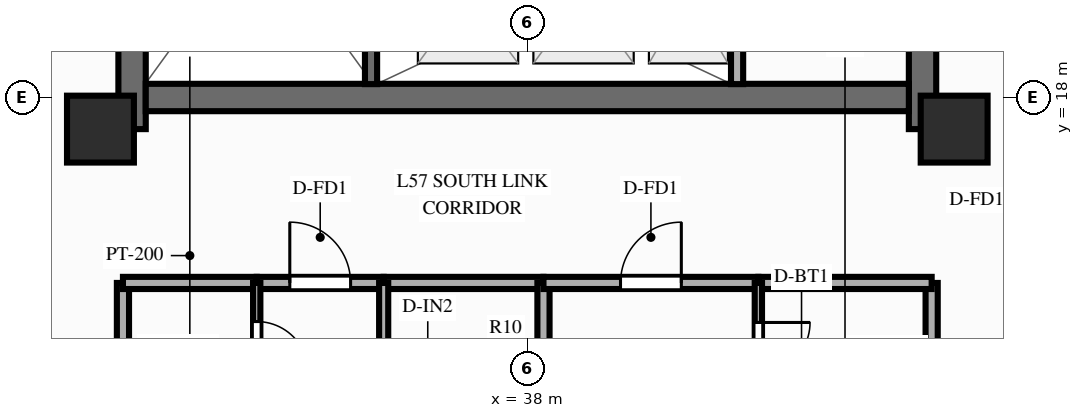
"""IFC4 building model, lengths in metres.
Left out: names, types, materials, properties, quantities, classifications, styles, units other than length and angle.
Written with IfcOpenShell. Run it as: python <this file> out.ifc"""

import sys

from ifc_helpers import new_model, si_unit, direction, frame, frame_2d, origin, origin_2d, place, context, subcontext, project, spatial, rectangle, extrude, source, transform, mapped, element, fill, save


model = new_model("IFC4")
c1 = context("Model", 3, precision=1e-05, world=origin(), true_north=direction((0.0, 1.0)))
c2 = subcontext(c1, "Body", "Model", "MODEL_VIEW")
j1 = project(units=[si_unit("LENGTHUNIT", "METRE"), si_unit("PLANEANGLEUNIT", "RADIAN")], contexts=[c1])
p1 = place(None, origin())
s1 = spatial("IfcSite", under=j1, at=p1, CompositionType="ELEMENT")
p2 = place(p1, origin())
s2 = spatial("IfcBuilding", under=s1, at=p2, CompositionType="ELEMENT")
p3 = place(p2, frame((0.0, 0.0, 182.8)))
s3 = spatial("IfcBuildingStorey", under=s2, at=p3, CompositionType="ELEMENT", Elevation=182.8)
p4 = place(p3, frame((31.5, 17.48, 0.0), z_axis=(0.0, 0.0, 1.0), x_axis=(0.0, 1.0, 0.0)))
e1 = element("IfcWall", 1, at=p4, inside=s3, PredefinedType="SHEAR", context=c2, shape_type="SweptSolid", body=[
    extrude(rectangle(XDim=19.04, YDim=0.45, at=frame_2d((9.52, 0.0))), origin(), (0.0, 0.0, 1.0), 3.9),
])
p5 = place(p4, frame((6.32, 0.0, 0.0)))
e2 = element("IfcOpeningElement", 2, at=p5, cuts=e1, PredefinedType="OPENING", context=c2, shape_type="SweptSolid", body=[
    extrude(rectangle(XDim=1.1, YDim=2.15, at=frame_2d((0.55, 1.075))), frame((0.0, 0.237, 0.0), z_axis=(0.0, -1.0, 0.0), x_axis=(1.0, 0.0, 0.0)), (0.0, 0.0, 1.0), 0.474),
])
p6 = place(p3, frame((44.5, 17.48, 0.0), z_axis=(0.0, 0.0, 1.0), x_axis=(0.0, 1.0, 0.0)))
e3 = element("IfcWall", 3, at=p6, inside=s3, PredefinedType="SHEAR", context=c2, shape_type="SweptSolid", body=[
    extrude(rectangle(XDim=19.04, YDim=0.45, at=frame_2d((9.52, 0.0))), origin(), (0.0, 0.0, 1.0), 3.9),
])
p7 = place(p6, frame((12.67, 0.0, 0.0), z_axis=(0.0, 0.0, 1.0), x_axis=(-1.0, 0.0, 0.0)))
e4 = element("IfcOpeningElement", 4, at=p7, cuts=e3, PredefinedType="OPENING", context=c2, shape_type="SweptSolid", body=[
    extrude(rectangle(XDim=1.1, YDim=2.15, at=frame_2d((0.55, 1.075))), frame((0.0, 0.237, 0.0), z_axis=(0.0, -1.0, 0.0), x_axis=(1.0, 0.0, 0.0)), (0.0, 0.0, 1.0), 0.474),
])
p8 = place(p3, frame((31.725, 18.0, 0.0), z_axis=(0.0, 0.0, 1.0), x_axis=(1.0, 0.0, 0.0)))
e5 = element("IfcWall", 5, at=p8, inside=s3, PredefinedType="SHEAR", context=c2, shape_type="SweptSolid", body=[
    extrude(rectangle(XDim=12.55, YDim=0.45, at=frame_2d((6.275, 0.0))), origin(), (0.0, 0.0, 1.0), 3.9),
])
m1 = source(origin(), c2, "Body", "SweptSolid", [
    extrude(rectangle(XDim=1.1, YDim=1.1, at=origin_2d()), origin(), (0.0, 0.0, 1.0), 3.9),
])
for number, where, z_axis, x_axis in (
    (6, (30.98, 17.48, 0.0), (0.0, 0.0, 1.0), (1.0, 0.0, 0.0)),
    (7, (45.02, 17.48, 0.0), (0.0, 0.0, 1.0), (1.0, 0.0, 0.0)),
):
    element("IfcColumn", number, at=place(p3, frame(where, z_axis=z_axis, x_axis=x_axis)), inside=s3, PredefinedType="COLUMN", context=c2, shape_type="MappedRepresentation", body=[
        mapped(m1, transform((0.0, 0.0, 0.0), scale=1.0)),
    ])
p9 = place(p3, frame((41.45, 18.22, 0.0), z_axis=(0.0, 0.0, 1.0), x_axis=(0.0, 1.0, 0.0)))
e8 = element("IfcWall", 8, at=p9, inside=s3, PredefinedType="PARTITIONING", context=c2, shape_type="SweptSolid", body=[
    extrude(rectangle(XDim=2.86, YDim=0.2, at=frame_2d((1.43, 0.0))), origin(), (0.0, 0.0, 1.0), 3.69),
])
p10 = place(p3, frame((35.43, 18.22, 0.0), z_axis=(0.0, 0.0, 1.0), x_axis=(0.0, 1.0, 0.0)))
e9 = element("IfcWall", 9, at=p10, inside=s3, PredefinedType="SOLIDWALL", context=c2, shape_type="SweptSolid", body=[
    extrude(rectangle(XDim=7.22, YDim=0.2, at=frame_2d((3.61, 0.0))), origin(), (0.0, 0.0, 1.0), 3.69),
])
p11 = place(p10, frame((6.68, 0.0, 0.0), z_axis=(0.0, 0.0, 1.0), x_axis=(-1.0, 0.0, 0.0)))
e10 = element("IfcOpeningElement", 10, at=p11, cuts=e9, PredefinedType="OPENING", context=c2, shape_type="SweptSolid", body=[
    extrude(rectangle(XDim=1.1, YDim=2.15, at=frame_2d((0.55, 1.075))), frame((0.0, 0.112, 0.0), z_axis=(0.0, -1.0, 0.0), x_axis=(1.0, 0.0, 0.0)), (0.0, 0.0, 1.0), 0.224),
])
for number, where, z_axis, x_axis in (
    (11, (31.35, 14.95, 0.0), (0.0, 0.0, 1.0), (0.0, -1.0, 0.0)),
    (12, (44.65, 14.95, 0.0), (0.0, 0.0, 1.0), (0.0, -1.0, 0.0)),
):
    element("IfcWall", number, at=place(p3, frame(where, z_axis=z_axis, x_axis=x_axis)), inside=s3, PredefinedType="PARTITIONING", context=c2, shape_type="SweptSolid", body=[
        extrude(rectangle(XDim=8.8, YDim=0.2, at=frame_2d((4.4, 0.0))), origin(), (0.0, 0.0, 1.0), 2.79),
    ])
p12 = place(p3, frame((31.35, 14.95, 0.0), z_axis=(0.0, 0.0, 1.0), x_axis=(1.0, 0.0, 0.0)))
e13 = element("IfcWall", 13, at=p12, inside=s3, PredefinedType="PARTITIONING", context=c2, shape_type="SweptSolid", body=[
    extrude(rectangle(XDim=2.2, YDim=0.2, at=frame_2d((1.1, 0.0))), origin(), (0.0, 0.0, 1.0), 3.69),
])
p13 = place(p3, frame((33.55, 14.95, 0.0), z_axis=(0.0, 0.0, 1.0), x_axis=(1.0, 0.0, 0.0)))
e14 = element("IfcWall", 14, at=p13, inside=s3, PredefinedType="PARTITIONING", context=c2, shape_type="SweptSolid", body=[
    extrude(rectangle(XDim=2.088, YDim=0.2, at=frame_2d((1.044, 0.0))), origin(), (0.0, 0.0, 1.0), 3.69),
])
p14 = place(p13, frame((0.544, 0.0, 0.0)))
e15 = element("IfcOpeningElement", 15, at=p14, cuts=e14, PredefinedType="OPENING", context=c2, shape_type="SweptSolid", body=[
    extrude(rectangle(XDim=1.0, YDim=2.15, at=frame_2d((0.5, 1.075))), frame((0.0, 0.112, 0.0), z_axis=(0.0, -1.0, 0.0), x_axis=(1.0, 0.0, 0.0)), (0.0, 0.0, 1.0), 0.224),
])
p15 = place(p3, frame((35.638, 14.95, 0.0), z_axis=(0.0, 0.0, 1.0), x_axis=(1.0, 0.0, 0.0)))
e16 = element("IfcWall", 16, at=p15, inside=s3, PredefinedType="PARTITIONING", context=c2, shape_type="SweptSolid", body=[
    extrude(rectangle(XDim=2.628, YDim=0.2, at=frame_2d((1.314, 0.0))), origin(), (0.0, 0.0, 1.0), 3.69),
])
p16 = place(p3, frame((33.55, 14.95, 0.0), z_axis=(0.0, 0.0, 1.0), x_axis=(0.0, -1.0, 0.0)))
e17 = element("IfcWall", 17, at=p16, inside=s3, PredefinedType="PARTITIONING", context=c2, shape_type="SweptSolid", body=[
    extrude(rectangle(XDim=2.12, YDim=0.12, at=frame_2d((1.06, 0.0))), origin(), (0.0, 0.0, 1.0), 3.69),
])
p17 = place(p16, frame((0.635, 0.0, 0.0)))
e18 = element("IfcOpeningElement", 18, at=p17, cuts=e17, PredefinedType="OPENING", context=c2, shape_type="SweptSolid", body=[
    extrude(rectangle(XDim=0.85, YDim=2.05, at=frame_2d((0.425, 1.025))), frame((0.0, 0.072, 0.0), z_axis=(0.0, -1.0, 0.0), x_axis=(1.0, 0.0, 0.0)), (0.0, 0.0, 1.0), 0.144),
])
p18 = place(p3, frame((35.638, 14.95, 0.0), z_axis=(0.0, 0.0, 1.0), x_axis=(0.0, -1.0, 0.0)))
e19 = element("IfcWall", 19, at=p18, inside=s3, PredefinedType="PARTITIONING", context=c2, shape_type="SweptSolid", body=[
    extrude(rectangle(XDim=3.16, YDim=0.15, at=frame_2d((1.58, 0.0))), origin(), (0.0, 0.0, 1.0), 3.69),
])
p19 = place(p18, frame((1.13, 0.0, 0.0)))
e20 = element("IfcOpeningElement", 20, at=p19, cuts=e19, PredefinedType="OPENING", context=c2, shape_type="SweptSolid", body=[
    extrude(rectangle(XDim=0.9, YDim=2.1, at=frame_2d((0.45, 1.05))), frame((0.0, 0.087, 0.0), z_axis=(0.0, -1.0, 0.0), x_axis=(1.0, 0.0, 0.0)), (0.0, 0.0, 1.0), 0.174),
])
p20 = place(p3, frame((38.266, 14.95, 0.0), z_axis=(0.0, 0.0, 1.0), x_axis=(0.0, -1.0, 0.0)))
e21 = element("IfcWall", 21, at=p20, inside=s3, PredefinedType="PARTITIONING", context=c2, shape_type="SweptSolid", body=[
    extrude(rectangle(XDim=8.8, YDim=0.2, at=frame_2d((4.4, 0.0))), origin(), (0.0, 0.0, 1.0), 3.69),
])
p21 = place(p3, frame((38.266, 14.95, 0.0), z_axis=(0.0, 0.0, 1.0), x_axis=(1.0, 0.0, 0.0)))
e22 = element("IfcWall", 22, at=p21, inside=s3, PredefinedType="PARTITIONING", context=c2, shape_type="SweptSolid", body=[
    extrude(rectangle(XDim=3.534, YDim=0.2, at=frame_2d((1.767, 0.0))), origin(), (0.0, 0.0, 1.0), 3.69),
])
p22 = place(p21, frame((1.267, 0.0, 0.0)))
e23 = element("IfcOpeningElement", 23, at=p22, cuts=e22, PredefinedType="OPENING", context=c2, shape_type="SweptSolid", body=[
    extrude(rectangle(XDim=1.0, YDim=2.15, at=frame_2d((0.5, 1.075))), frame((0.0, 0.112, 0.0), z_axis=(0.0, -1.0, 0.0), x_axis=(1.0, 0.0, 0.0)), (0.0, 0.0, 1.0), 0.224),
])
p23 = place(p3, frame((41.8, 14.95, 0.0), z_axis=(0.0, 0.0, 1.0), x_axis=(1.0, 0.0, 0.0)))
e24 = element("IfcWall", 24, at=p23, inside=s3, PredefinedType="PARTITIONING", context=c2, shape_type="SweptSolid", body=[
    extrude(rectangle(XDim=2.85, YDim=0.2, at=frame_2d((1.425, 0.0))), origin(), (0.0, 0.0, 1.0), 3.69),
])
p24 = place(p3, frame((41.8, 14.95, 0.0), z_axis=(0.0, 0.0, 1.0), x_axis=(0.0, -1.0, 0.0)))
e25 = element("IfcWall", 25, at=p24, inside=s3, PredefinedType="PARTITIONING", context=c2, shape_type="SweptSolid", body=[
    extrude(rectangle(XDim=2.15, YDim=0.12, at=frame_2d((1.075, 0.0))), origin(), (0.0, 0.0, 1.0), 3.69),
])
p25 = place(p24, frame((0.65, 0.0, 0.0)))
e26 = element("IfcOpeningElement", 26, at=p25, cuts=e25, PredefinedType="OPENING", context=c2, shape_type="SweptSolid", body=[
    extrude(rectangle(XDim=0.85, YDim=2.05, at=frame_2d((0.425, 1.025))), frame((0.0, 0.072, 0.0), z_axis=(0.0, -1.0, 0.0), x_axis=(1.0, 0.0, 0.0)), (0.0, 0.0, 1.0), 0.144),
])
m2 = source(origin(), c2, "Body", "SweptSolid", [
    extrude(rectangle(XDim=1.0, YDim=2.15, at=frame_2d((0.5, 1.075))), frame((0.0, 0.025, 0.0), z_axis=(0.0, -1.0, 0.0), x_axis=(1.0, 0.0, 0.0)), (0.0, 0.0, 1.0), 0.05),
])
p26 = place(p14, origin())
e27 = element("IfcDoor", 27, at=p26, inside=s3, OperationType="SINGLE_SWING_LEFT", PredefinedType="DOOR", context=c2, shape_type="MappedRepresentation", body=[
    mapped(m2, transform((0.0, 0.0, 0.0), scale=1.0)),
])
fill(e15, e27)
m3 = source(origin(), c2, "Body", "SweptSolid", [
    extrude(rectangle(XDim=0.85, YDim=2.05, at=frame_2d((0.425, 1.025))), frame((0.0, 0.025, 0.0), z_axis=(0.0, -1.0, 0.0), x_axis=(1.0, 0.0, 0.0)), (0.0, 0.0, 1.0), 0.05),
])
p27 = place(p17, origin())
e28 = element("IfcDoor", 28, at=p27, inside=s3, OperationType="SINGLE_SWING_RIGHT", PredefinedType="DOOR", context=c2, shape_type="MappedRepresentation", body=[
    mapped(m3, transform((0.0, 0.0, 0.0), scale=1.0)),
])
fill(e18, e28)
p28 = place(p22, origin())
e29 = element("IfcDoor", 29, at=p28, inside=s3, OperationType="SINGLE_SWING_RIGHT", PredefinedType="DOOR", context=c2, shape_type="MappedRepresentation", body=[
    mapped(m2, transform((0.0, 0.0, 0.0), scale=1.0)),
])
fill(e23, e29)
p29 = place(p25, origin())
e30 = element("IfcDoor", 30, at=p29, inside=s3, OperationType="SINGLE_SWING_LEFT", PredefinedType="DOOR", context=c2, shape_type="MappedRepresentation", body=[
    mapped(m3, transform((0.0, 0.0, 0.0), scale=1.0)),
])
fill(e26, e30)
save(model, sys.argv[1])
